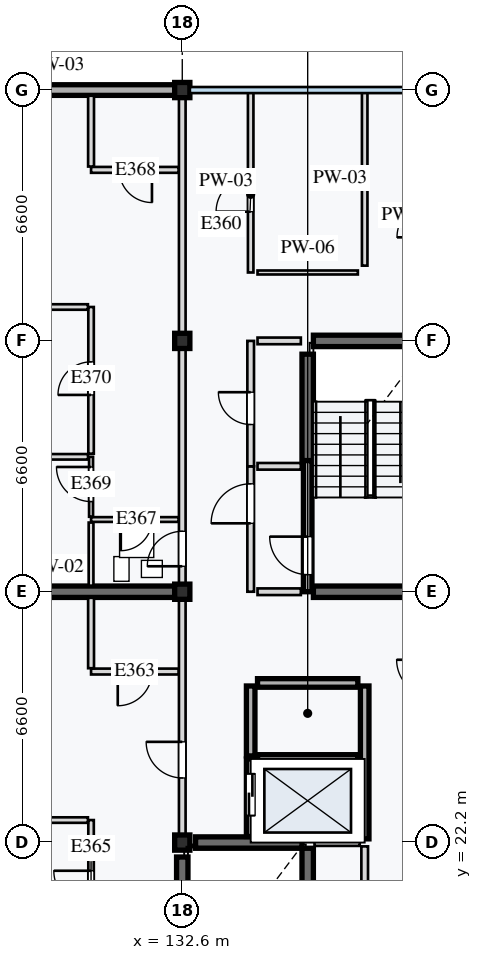
"""IFC4 building model, lengths in metres.
Left out: names, types, materials, properties, quantities, classifications, styles, units other than length and angle.
Written with IfcOpenShell. Run it as: python <this file> out.ifc"""

import sys

from ifc_helpers import new_model, si_unit, direction, frame, frame_2d, origin, origin_2d, place, context, subcontext, project, spatial, rectangle, extrude, element, fill, save


model = new_model("IFC4")
c1 = context("Model", 3, precision=1e-05, world=origin(), true_north=direction((0.0, 1.0)))
c2 = subcontext(c1, "Body", "Model", "MODEL_VIEW")
j1 = project(units=[si_unit("LENGTHUNIT", "METRE"), si_unit("PLANEANGLEUNIT", "RADIAN")], contexts=[c1])
p1 = place(None, origin())
s1 = spatial("IfcSite", under=j1, at=p1, CompositionType="ELEMENT")
p2 = place(p1, origin())
s2 = spatial("IfcBuilding", under=s1, at=p2, CompositionType="ELEMENT")
p3 = place(p2, frame((0.0, 0.0, 30.8)))
s3 = spatial("IfcBuildingStorey", under=s2, at=p3, CompositionType="ELEMENT", Elevation=30.8)
for number, where, z_axis, x_axis in (
    (1, (132.6, 22.2, 0.0), (0.0, 0.0, 1.0), (1.0, 0.0, 0.0)),
    (2, (132.6, 28.8, 0.0), (0.0, 0.0, 1.0), (1.0, 0.0, 0.0)),
    (3, (132.6, 35.4, 0.0), (0.0, 0.0, 1.0), (1.0, 0.0, 0.0)),
    (4, (132.6, 42.0, 0.0), (0.0, 0.0, 1.0), (1.0, 0.0, 0.0)),
):
    element("IfcColumn", number, at=place(p3, frame(where, z_axis=z_axis, x_axis=x_axis)), inside=s3, PredefinedType="COLUMN", context=c2, shape_type="SweptSolid", body=[
        extrude(rectangle(XDim=0.4, YDim=0.4, at=origin_2d()), origin(), (0.0, 0.0, 1.0), 3.2),
    ])
p4 = place(p3, frame((132.6, 15.98, 0.0), z_axis=(0.0, 0.0, 1.0), x_axis=(0.0, 1.0, 0.0)))
e5 = element("IfcWall", 5, at=p4, inside=s3, PredefinedType="SHEAR", context=c2, shape_type="SweptSolid", body=[
    extrude(rectangle(XDim=5.84, YDim=0.3, at=frame_2d((2.92, 0.0))), origin(), (0.0, 0.0, 1.0), 2.97),
])
p5 = place(p3, frame((135.9, 19.35, 0.0), z_axis=(0.0, 0.0, 1.0), x_axis=(0.0, 1.0, 0.0)))
e6 = element("IfcWall", 6, at=p5, inside=s3, PredefinedType="SHEAR", context=c2, shape_type="SweptSolid", body=[
    extrude(rectangle(XDim=2.7, YDim=0.3, at=frame_2d((1.35, 0.0))), origin(), (0.0, 0.0, 1.0), 2.97),
])
for number, where, z_axis, x_axis in (
    (7, (132.95, 22.2, 0.0), (0.0, 0.0, 1.0), (1.0, 0.0, 0.0)),
    (8, (135.9, 32.25, 0.0), (0.0, 0.0, 1.0), (0.0, 1.0, 0.0)),
    (9, (136.05, 28.8, 0.0), (0.0, 0.0, 1.0), (1.0, 0.0, 0.0)),
    (10, (136.05, 35.4, 0.0), (0.0, 0.0, 1.0), (1.0, 0.0, 0.0)),
):
    element("IfcWall", number, at=place(p3, frame(where, z_axis=z_axis, x_axis=x_axis)), inside=s3, PredefinedType="SHEAR", context=c2, shape_type="SweptSolid", body=[
        extrude(rectangle(XDim=2.8, YDim=0.3, at=frame_2d((1.4, 0.0))), origin(), (0.0, 0.0, 1.0), 2.97),
    ])
p6 = place(p3, frame((126.2, 28.8, 0.0), z_axis=(0.0, 0.0, 1.0), x_axis=(1.0, 0.0, 0.0)))
e11 = element("IfcWall", 11, at=p6, inside=s3, PredefinedType="SHEAR", context=c2, shape_type="SweptSolid", body=[
    extrude(rectangle(XDim=6.2, YDim=0.3, at=frame_2d((3.1, 0.0))), origin(), (0.0, 0.0, 1.0), 2.97),
])
p7 = place(p3, frame((126.2, 42.0, 0.0), z_axis=(0.0, 0.0, 1.0), x_axis=(1.0, 0.0, 0.0)))
e12 = element("IfcWall", 12, at=p7, inside=s3, PredefinedType="STANDARD", context=c2, shape_type="SweptSolid", body=[
    extrude(rectangle(XDim=6.2, YDim=0.28, at=frame_2d((3.1, 0.0))), origin(), (0.0, 0.0, 1.0), 2.65),
])
p8 = place(p3, frame((137.4, 19.3, 0.0), z_axis=(0.0, 0.0, 1.0), x_axis=(0.0, 1.0, 0.0)))
e13 = element("IfcWall", 13, at=p8, inside=s3, PredefinedType="PARTITIONING", context=c2, shape_type="SweptSolid", body=[
    extrude(rectangle(XDim=2.8, YDim=0.175, at=frame_2d((1.4, 0.0))), origin(), (0.0, 0.0, 1.0), 2.97),
])
p9 = place(p8, frame((0.95, 0.0, 0.0)))
e14 = element("IfcOpeningElement", 14, at=p9, cuts=e13, PredefinedType="OPENING", context=c2, shape_type="SweptSolid", body=[
    extrude(rectangle(XDim=0.85, YDim=2.0, at=frame_2d((0.425, 1.0))), frame((0.0, 0.097, 0.0), z_axis=(0.0, -1.0, 0.0), x_axis=(1.0, 0.0, 0.0)), (0.0, 0.0, 1.0), 0.195),
])
p10 = place(p3, frame((136.08, 22.2, 0.0), z_axis=(0.0, 0.0, 1.0), x_axis=(1.0, 0.0, 0.0)))
e15 = element("IfcWall", 15, at=p10, inside=s3, PredefinedType="PARTITIONING", context=c2, shape_type="SweptSolid", body=[
    extrude(rectangle(XDim=1.19, YDim=0.175, at=frame_2d((0.595, 0.0))), origin(), (0.0, 0.0, 1.0), 2.97),
])
p11 = place(p3, frame((134.4, 22.36, 0.0), z_axis=(0.0, 0.0, 1.0), x_axis=(0.0, 1.0, 0.0)))
e16 = element("IfcWall", 16, at=p11, inside=s3, PredefinedType="STANDARD", context=c2, shape_type="SweptSolid", body=[
    extrude(rectangle(XDim=2.04, YDim=0.225, at=frame_2d((1.02, 0.0))), origin(), (0.0, 0.0, 1.0), 2.97),
])
p12 = place(p11, frame((0.55, 0.0, 0.0)))
e17 = element("IfcOpeningElement", 17, at=p12, cuts=e16, PredefinedType="OPENING", context=c2, shape_type="SweptSolid", body=[
    extrude(rectangle(XDim=1.1, YDim=2.1, at=frame_2d((0.55, 1.05))), frame((0.0, 0.123, 0.0), z_axis=(0.0, -1.0, 0.0), x_axis=(1.0, 0.0, 0.0)), (0.0, 0.0, 1.0), 0.245),
])
p13 = place(p3, frame((134.4, 24.48, 0.0), z_axis=(0.0, 0.0, 1.0), x_axis=(0.0, 1.0, 0.0)))
e18 = element("IfcWall", 18, at=p13, inside=s3, PredefinedType="STANDARD", context=c2, shape_type="SweptSolid", body=[
    extrude(rectangle(XDim=1.84, YDim=0.225, at=frame_2d((0.92, 0.0))), origin(), (0.0, 0.0, 1.0), 2.97),
])
p14 = place(p3, frame((137.4, 22.298, 0.0), z_axis=(0.0, 0.0, 1.0), x_axis=(0.0, 1.0, 0.0)))
e19 = element("IfcWall", 19, at=p14, inside=s3, PredefinedType="STANDARD", context=c2, shape_type="SweptSolid", body=[
    extrude(rectangle(XDim=4.022, YDim=0.225, at=frame_2d((2.011, 0.0))), origin(), (0.0, 0.0, 1.0), 2.97),
])
for number, where, z_axis, x_axis in (
    (20, (134.58, 24.4, 0.0), (0.0, 0.0, 1.0), (1.0, 0.0, 0.0)),
    (21, (134.58, 26.4, 0.0), (0.0, 0.0, 1.0), (1.0, 0.0, 0.0)),
):
    element("IfcWall", number, at=place(p3, frame(where, z_axis=z_axis, x_axis=x_axis)), inside=s3, PredefinedType="STANDARD", context=c2, shape_type="SweptSolid", body=[
        extrude(rectangle(XDim=2.64, YDim=0.225, at=frame_2d((1.32, 0.0))), origin(), (0.0, 0.0, 1.0), 2.97),
    ])
p15 = place(p3, frame((135.9, 28.8, 0.0), z_axis=(0.0, 0.0, 1.0), x_axis=(0.0, 1.0, 0.0)))
e22 = element("IfcWall", 22, at=p15, inside=s3, PredefinedType="STANDARD", context=c2, shape_type="SweptSolid", body=[
    extrude(rectangle(XDim=3.45, YDim=0.225, at=frame_2d((1.725, 0.0))), origin(), (0.0, 0.0, 1.0), 2.97),
])
p16 = place(p15, frame((0.45, 0.0, 0.0)))
e23 = element("IfcOpeningElement", 23, at=p16, cuts=e22, PredefinedType="OPENING", context=c2, shape_type="SweptSolid", body=[
    extrude(rectangle(XDim=1.0, YDim=2.16, at=frame_2d((0.5, 1.08))), frame((0.0, 0.123, 0.0), z_axis=(0.0, -1.0, 0.0), x_axis=(1.0, 0.0, 0.0)), (0.0, 0.0, 1.0), 0.245),
])
p17 = place(p3, frame((134.4, 28.8, 0.0), z_axis=(0.0, 0.0, 1.0), x_axis=(0.0, 1.0, 0.0)))
e24 = element("IfcWall", 24, at=p17, inside=s3, PredefinedType="PARTITIONING", context=c2, shape_type="SweptSolid", body=[
    extrude(rectangle(XDim=3.3, YDim=0.175, at=frame_2d((1.65, 0.0))), origin(), (0.0, 0.0, 1.0), 2.97),
])
p18 = place(p17, frame((1.8, 0.0, 0.0)))
e25 = element("IfcOpeningElement", 25, at=p18, cuts=e24, PredefinedType="OPENING", context=c2, shape_type="SweptSolid", body=[
    extrude(rectangle(XDim=1.04, YDim=2.12, at=frame_2d((0.52, 1.06))), frame((0.0, 0.097, 0.0), z_axis=(0.0, -1.0, 0.0), x_axis=(1.0, 0.0, 0.0)), (0.0, 0.0, 1.0), 0.195),
])
p19 = place(p3, frame((134.4, 32.1, 0.0), z_axis=(0.0, 0.0, 1.0), x_axis=(0.0, 1.0, 0.0)))
e26 = element("IfcWall", 26, at=p19, inside=s3, PredefinedType="PARTITIONING", context=c2, shape_type="SweptSolid", body=[
    extrude(rectangle(XDim=3.3, YDim=0.175, at=frame_2d((1.65, 0.0))), origin(), (0.0, 0.0, 1.0), 2.97),
])
p20 = place(p19, frame((1.1, 0.0, 0.0)))
e27 = element("IfcOpeningElement", 27, at=p20, cuts=e26, PredefinedType="OPENING", context=c2, shape_type="SweptSolid", body=[
    extrude(rectangle(XDim=0.85, YDim=2.0, at=frame_2d((0.425, 1.0))), frame((0.0, 0.097, 0.0), z_axis=(0.0, -1.0, 0.0), x_axis=(1.0, 0.0, 0.0)), (0.0, 0.0, 1.0), 0.195),
])
for number, where, z_axis, x_axis in (
    (28, (134.58, 28.8, 0.0), (0.0, 0.0, 1.0), (1.0, 0.0, 0.0)),
    (29, (134.58, 32.1, 0.0), (0.0, 0.0, 1.0), (1.0, 0.0, 0.0)),
    (30, (134.58, 35.4, 0.0), (0.0, 0.0, 1.0), (1.0, 0.0, 0.0)),
):
    element("IfcWall", number, at=place(p3, frame(where, z_axis=z_axis, x_axis=x_axis)), inside=s3, PredefinedType="PARTITIONING", context=c2, shape_type="SweptSolid", body=[
        extrude(rectangle(XDim=1.14, YDim=0.175, at=frame_2d((0.57, 0.0))), origin(), (0.0, 0.0, 1.0), 2.97),
    ])
p21 = place(p3, frame((134.4, 37.2, 0.0), z_axis=(0.0, 0.0, 1.0), x_axis=(0.0, 1.0, 0.0)))
e31 = element("IfcWall", 31, at=p21, inside=s3, PredefinedType="PARTITIONING", context=c2, shape_type="SweptSolid", body=[
    extrude(rectangle(XDim=4.8, YDim=0.145, at=frame_2d((2.4, 0.0))), origin(), (0.0, 0.0, 1.0), 2.97),
])
p22 = place(p21, frame((1.6, 0.0, 0.0)))
e32 = element("IfcOpeningElement", 32, at=p22, cuts=e31, PredefinedType="OPENING", context=c2, shape_type="SweptSolid", body=[
    extrude(rectangle(XDim=0.91, YDim=2.14, at=frame_2d((0.455, 1.07))), frame((0.0, 0.083, 0.0), z_axis=(0.0, -1.0, 0.0), x_axis=(1.0, 0.0, 0.0)), (0.0, 0.0, 1.0), 0.165),
])
p23 = place(p3, frame((137.4, 37.38, 0.0), z_axis=(0.0, 0.0, 1.0), x_axis=(0.0, 1.0, 0.0)))
e33 = element("IfcWall", 33, at=p23, inside=s3, PredefinedType="PARTITIONING", context=c2, shape_type="SweptSolid", body=[
    extrude(rectangle(XDim=4.6, YDim=0.145, at=frame_2d((2.3, 0.0))), origin(), (0.0, 0.0, 1.0), 2.97),
])
p24 = place(p3, frame((134.58, 37.2, 0.0), z_axis=(0.0, 0.0, 1.0), x_axis=(1.0, 0.0, 0.0)))
e34 = element("IfcWall", 34, at=p24, inside=s3, PredefinedType="PARTITIONING", context=c2, shape_type="SweptSolid", body=[
    extrude(rectangle(XDim=2.64, YDim=0.105, at=frame_2d((1.32, 0.0))), origin(), (0.0, 0.0, 1.0), 2.97),
])
p25 = place(p3, frame((132.6, 22.2, 0.0), z_axis=(0.0, 0.0, 1.0), x_axis=(0.0, 1.0, 0.0)))
e35 = element("IfcWall", 35, at=p25, inside=s3, PredefinedType="PARTITIONING", context=c2, shape_type="SweptSolid", body=[
    extrude(rectangle(XDim=6.6, YDim=0.175, at=frame_2d((3.3, 0.0))), origin(), (0.0, 0.0, 1.0), 2.55),
])
p26 = place(p25, frame((1.7, 0.0, 0.0)))
e36 = element("IfcOpeningElement", 36, at=p26, cuts=e35, PredefinedType="OPENING", context=c2, shape_type="SweptSolid", body=[
    extrude(rectangle(XDim=0.95, YDim=2.16, at=frame_2d((0.475, 1.08))), frame((0.0, 0.097, 0.0), z_axis=(0.0, -1.0, 0.0), x_axis=(1.0, 0.0, 0.0)), (0.0, 0.0, 1.0), 0.195),
])
p27 = place(p3, frame((132.502, 26.7, 0.0), z_axis=(0.0, 0.0, 1.0), x_axis=(-1.0, 0.0, 0.0)))
e37 = element("IfcWall", 37, at=p27, inside=s3, PredefinedType="PARTITIONING", context=c2, shape_type="SweptSolid", body=[
    extrude(rectangle(XDim=2.302, YDim=0.155, at=frame_2d((1.151, 0.0))), origin(), (0.0, 0.0, 1.0), 2.97),
])
p28 = place(p27, frame((0.7, 0.0, 0.0)))
e38 = element("IfcOpeningElement", 38, at=p28, cuts=e37, PredefinedType="OPENING", context=c2, shape_type="SweptSolid", body=[
    extrude(rectangle(XDim=0.9, YDim=2.1, at=frame_2d((0.45, 1.05))), frame((0.0, 0.087, 0.0), z_axis=(0.0, -1.0, 0.0), x_axis=(1.0, 0.0, 0.0)), (0.0, 0.0, 1.0), 0.175),
])
p29 = place(p3, frame((130.2, 26.788, 0.0), z_axis=(0.0, 0.0, 1.0), x_axis=(0.0, 1.0, 0.0)))
e39 = element("IfcWall", 39, at=p29, inside=s3, PredefinedType="PARTITIONING", context=c2, shape_type="SweptSolid", body=[
    extrude(rectangle(XDim=1.852, YDim=0.155, at=frame_2d((0.926, 0.0))), origin(), (0.0, 0.0, 1.0), 2.97),
])
p30 = place(p3, frame((130.2, 18.933, 0.0), z_axis=(0.0, 0.0, 1.0), x_axis=(0.0, 1.0, 0.0)))
e40 = element("IfcWall", 40, at=p30, inside=s3, PredefinedType="PARTITIONING", context=c2, shape_type="SweptSolid", body=[
    extrude(rectangle(XDim=3.859, YDim=0.145, at=frame_2d((1.93, 0.0))), origin(), (0.0, 0.0, 1.0), 2.97),
])
p31 = place(p30, frame((1.546, 0.0, 0.0)))
e41 = element("IfcOpeningElement", 41, at=p31, cuts=e40, PredefinedType="OPENING", context=c2, shape_type="SweptSolid", body=[
    extrude(rectangle(XDim=0.98, YDim=2.12, at=frame_2d((0.49, 1.06))), frame((0.0, 0.083, 0.0), z_axis=(0.0, -1.0, 0.0), x_axis=(1.0, 0.0, 0.0)), (0.0, 0.0, 1.0), 0.165),
])
p32 = place(p3, frame((130.117, 22.792, 0.0), z_axis=(0.0, 0.0, 1.0), x_axis=(-1.0, 0.0, 0.0)))
e42 = element("IfcWall", 42, at=p32, inside=s3, PredefinedType="PARTITIONING", context=c2, shape_type="SweptSolid", body=[
    extrude(rectangle(XDim=3.968, YDim=0.145, at=frame_2d((1.984, 0.0))), origin(), (0.0, 0.0, 1.0), 2.97),
])
p33 = place(p3, frame((132.6, 28.8, 0.0), z_axis=(0.0, 0.0, 1.0), x_axis=(0.0, 1.0, 0.0)))
e43 = element("IfcWall", 43, at=p33, inside=s3, PredefinedType="PARTITIONING", context=c2, shape_type="SweptSolid", body=[
    extrude(rectangle(XDim=13.2, YDim=0.175, at=frame_2d((6.6, 0.0))), origin(), (0.0, 0.0, 1.0), 2.55),
])
p34 = place(p33, frame((0.67, 0.0, 0.0)))
e44 = element("IfcOpeningElement", 44, at=p34, cuts=e43, PredefinedType="OPENING", context=c2, shape_type="SweptSolid", body=[
    extrude(rectangle(XDim=0.92, YDim=2.14, at=frame_2d((0.46, 1.07))), frame((0.0, 0.097, 0.0), z_axis=(0.0, -1.0, 0.0), x_axis=(1.0, 0.0, 0.0)), (0.0, 0.0, 1.0), 0.195),
])
p35 = place(p3, frame((132.502, 30.7, 0.0), z_axis=(0.0, 0.0, 1.0), x_axis=(-1.0, 0.0, 0.0)))
e45 = element("IfcWall", 45, at=p35, inside=s3, PredefinedType="PARTITIONING", context=c2, shape_type="SweptSolid", body=[
    extrude(rectangle(XDim=2.302, YDim=0.125, at=frame_2d((1.151, 0.0))), origin(), (0.0, 0.0, 1.0), 2.97),
])
p36 = place(p35, frame((0.7, 0.0, 0.0)))
e46 = element("IfcOpeningElement", 46, at=p36, cuts=e45, PredefinedType="OPENING", context=c2, shape_type="SweptSolid", body=[
    extrude(rectangle(XDim=0.82, YDim=2.05, at=frame_2d((0.41, 1.025))), frame((0.0, 0.073, 0.0), z_axis=(0.0, -1.0, 0.0), x_axis=(1.0, 0.0, 0.0)), (0.0, 0.0, 1.0), 0.145),
])
p37 = place(p3, frame((130.2, 28.96, 0.0), z_axis=(0.0, 0.0, 1.0), x_axis=(0.0, 1.0, 0.0)))
e47 = element("IfcWall", 47, at=p37, inside=s3, PredefinedType="PARTITIONING", context=c2, shape_type="SweptSolid", body=[
    extrude(rectangle(XDim=1.66, YDim=0.125, at=frame_2d((0.83, 0.0))), origin(), (0.0, 0.0, 1.0), 2.97),
])
p38 = place(p3, frame((132.502, 39.9, 0.0), z_axis=(0.0, 0.0, 1.0), x_axis=(-1.0, 0.0, 0.0)))
e48 = element("IfcWall", 48, at=p38, inside=s3, PredefinedType="PARTITIONING", context=c2, shape_type="SweptSolid", body=[
    extrude(rectangle(XDim=2.302, YDim=0.155, at=frame_2d((1.151, 0.0))), origin(), (0.0, 0.0, 1.0), 2.97),
])
p39 = place(p38, frame((0.7, 0.0, 0.0)))
e49 = element("IfcOpeningElement", 49, at=p39, cuts=e48, PredefinedType="OPENING", context=c2, shape_type="SweptSolid", body=[
    extrude(rectangle(XDim=0.86, YDim=2.12, at=frame_2d((0.43, 1.06))), frame((0.0, 0.087, 0.0), z_axis=(0.0, -1.0, 0.0), x_axis=(1.0, 0.0, 0.0)), (0.0, 0.0, 1.0), 0.175),
])
p40 = place(p3, frame((130.2, 39.988, 0.0), z_axis=(0.0, 0.0, 1.0), x_axis=(0.0, 1.0, 0.0)))
e50 = element("IfcWall", 50, at=p40, inside=s3, PredefinedType="PARTITIONING", context=c2, shape_type="SweptSolid", body=[
    extrude(rectangle(XDim=1.863, YDim=0.155, at=frame_2d((0.931, 0.0))), origin(), (0.0, 0.0, 1.0), 2.97),
])
p41 = place(p3, frame((130.2, 30.772, 0.0), z_axis=(0.0, 0.0, 1.0), x_axis=(0.0, 1.0, 0.0)))
e51 = element("IfcWall", 51, at=p41, inside=s3, PredefinedType="PARTITIONING", context=c2, shape_type="SweptSolid", body=[
    extrude(rectangle(XDim=1.578, YDim=0.105, at=frame_2d((0.789, 0.0))), origin(), (0.0, 0.0, 1.0), 2.97),
])
p42 = place(p41, frame((0.4, 0.0, 0.0)))
e52 = element("IfcOpeningElement", 52, at=p42, cuts=e51, PredefinedType="OPENING", context=c2, shape_type="SweptSolid", body=[
    extrude(rectangle(XDim=0.91, YDim=2.14, at=frame_2d((0.455, 1.07))), frame((0.0, 0.062, 0.0), z_axis=(0.0, -1.0, 0.0), x_axis=(1.0, 0.0, 0.0)), (0.0, 0.0, 1.0), 0.125),
])
p43 = place(p3, frame((130.12, 32.35, 0.0), z_axis=(0.0, 0.0, 1.0), x_axis=(-1.0, 0.0, 0.0)))
e53 = element("IfcWall", 53, at=p43, inside=s3, PredefinedType="PARTITIONING", context=c2, shape_type="SweptSolid", body=[
    extrude(rectangle(XDim=3.97, YDim=0.145, at=frame_2d((1.985, 0.0))), origin(), (0.0, 0.0, 1.0), 2.97),
])
p44 = place(p3, frame((130.2, 32.433, 0.0), z_axis=(0.0, 0.0, 1.0), x_axis=(0.0, 1.0, 0.0)))
e54 = element("IfcWall", 54, at=p44, inside=s3, PredefinedType="PARTITIONING", context=c2, shape_type="SweptSolid", body=[
    extrude(rectangle(XDim=3.859, YDim=0.145, at=frame_2d((1.93, 0.0))), origin(), (0.0, 0.0, 1.0), 2.97),
])
p45 = place(p44, frame((1.546, 0.0, 0.0)))
e55 = element("IfcOpeningElement", 55, at=p45, cuts=e54, PredefinedType="OPENING", context=c2, shape_type="SweptSolid", body=[
    extrude(rectangle(XDim=0.87, YDim=2.08, at=frame_2d((0.435, 1.04))), frame((0.0, 0.083, 0.0), z_axis=(0.0, -1.0, 0.0), x_axis=(1.0, 0.0, 0.0)), (0.0, 0.0, 1.0), 0.165),
])
p46 = place(p3, frame((130.117, 36.292, 0.0), z_axis=(0.0, 0.0, 1.0), x_axis=(-1.0, 0.0, 0.0)))
e56 = element("IfcWall", 56, at=p46, inside=s3, PredefinedType="PARTITIONING", context=c2, shape_type="SweptSolid", body=[
    extrude(rectangle(XDim=3.968, YDim=0.145, at=frame_2d((1.984, 0.0))), origin(), (0.0, 0.0, 1.0), 2.97),
])
p47 = place(p12, origin())
e57 = element("IfcDoor", 57, at=p47, inside=s3, OperationType="DOUBLE_DOOR_SLIDING", PredefinedType="DOOR", context=c2, shape_type="SweptSolid", body=[
    extrude(rectangle(XDim=1.1, YDim=2.1, at=frame_2d((0.55, 1.05))), frame((0.0, 0.025, 0.0), z_axis=(0.0, -1.0, 0.0), x_axis=(1.0, 0.0, 0.0)), (0.0, 0.0, 1.0), 0.05),
])
fill(e17, e57)
p48 = place(p16, origin())
e58 = element("IfcDoor", 58, at=p48, inside=s3, OperationType="SINGLE_SWING_RIGHT", PredefinedType="DOOR", context=c2, shape_type="SweptSolid", body=[
    extrude(rectangle(XDim=1.0, YDim=2.16, at=frame_2d((0.5, 1.08))), frame((0.0, 0.025, 0.0), z_axis=(0.0, -1.0, 0.0), x_axis=(1.0, 0.0, 0.0)), (0.0, 0.0, 1.0), 0.05),
])
fill(e23, e58)
p49 = place(p18, origin())
e59 = element("IfcDoor", 59, at=p49, inside=s3, OperationType="SINGLE_SWING_LEFT", PredefinedType="DOOR", context=c2, shape_type="SweptSolid", body=[
    extrude(rectangle(XDim=1.04, YDim=2.12, at=frame_2d((0.52, 1.06))), frame((0.0, 0.025, 0.0), z_axis=(0.0, -1.0, 0.0), x_axis=(1.0, 0.0, 0.0)), (0.0, 0.0, 1.0), 0.05),
])
fill(e25, e59)
p50 = place(p20, origin())
e60 = element("IfcDoor", 60, at=p50, inside=s3, OperationType="SINGLE_SWING_RIGHT", PredefinedType="DOOR", context=c2, shape_type="SweptSolid", body=[
    extrude(rectangle(XDim=0.85, YDim=2.0, at=frame_2d((0.425, 1.0))), frame((0.0, 0.025, 0.0), z_axis=(0.0, -1.0, 0.0), x_axis=(1.0, 0.0, 0.0)), (0.0, 0.0, 1.0), 0.05),
])
fill(e27, e60)
p51 = place(p22, origin())
e61 = element("IfcDoor", 61, at=p51, inside=s3, OperationType="SINGLE_SWING_LEFT", PredefinedType="DOOR", context=c2, shape_type="SweptSolid", body=[
    extrude(rectangle(XDim=0.91, YDim=2.14, at=frame_2d((0.455, 1.07))), frame((0.0, 0.025, 0.0), z_axis=(0.0, -1.0, 0.0), x_axis=(1.0, 0.0, 0.0)), (0.0, 0.0, 1.0), 0.05),
])
fill(e32, e61)
p52 = place(p26, origin())
e62 = element("IfcDoor", 62, at=p52, inside=s3, OperationType="SINGLE_SWING_RIGHT", PredefinedType="DOOR", context=c2, shape_type="SweptSolid", body=[
    extrude(rectangle(XDim=0.95, YDim=2.16, at=frame_2d((0.475, 1.08))), frame((0.0, 0.025, 0.0), z_axis=(0.0, -1.0, 0.0), x_axis=(1.0, 0.0, 0.0)), (0.0, 0.0, 1.0), 0.05),
])
fill(e36, e62)
p53 = place(p28, origin())
e63 = element("IfcDoor", 63, at=p53, inside=s3, OperationType="SINGLE_SWING_RIGHT", PredefinedType="DOOR", context=c2, shape_type="SweptSolid", body=[
    extrude(rectangle(XDim=0.9, YDim=2.1, at=frame_2d((0.45, 1.05))), frame((0.0, 0.025, 0.0), z_axis=(0.0, -1.0, 0.0), x_axis=(1.0, 0.0, 0.0)), (0.0, 0.0, 1.0), 0.05),
])
fill(e38, e63)
p54 = place(p31, origin())
e64 = element("IfcDoor", 64, at=p54, inside=s3, OperationType="SINGLE_SWING_RIGHT", PredefinedType="DOOR", context=c2, shape_type="SweptSolid", body=[
    extrude(rectangle(XDim=0.98, YDim=2.12, at=frame_2d((0.49, 1.06))), frame((0.0, 0.025, 0.0), z_axis=(0.0, -1.0, 0.0), x_axis=(1.0, 0.0, 0.0)), (0.0, 0.0, 1.0), 0.05),
])
fill(e41, e64)
p55 = place(p34, origin())
e65 = element("IfcDoor", 65, at=p55, inside=s3, OperationType="SINGLE_SWING_LEFT", PredefinedType="DOOR", context=c2, shape_type="SweptSolid", body=[
    extrude(rectangle(XDim=0.92, YDim=2.14, at=frame_2d((0.46, 1.07))), frame((0.0, 0.025, 0.0), z_axis=(0.0, -1.0, 0.0), x_axis=(1.0, 0.0, 0.0)), (0.0, 0.0, 1.0), 0.05),
])
fill(e44, e65)
p56 = place(p36, origin())
e66 = element("IfcDoor", 66, at=p56, inside=s3, OperationType="SINGLE_SWING_RIGHT", PredefinedType="DOOR", context=c2, shape_type="SweptSolid", body=[
    extrude(rectangle(XDim=0.82, YDim=2.05, at=frame_2d((0.41, 1.025))), frame((0.0, 0.025, 0.0), z_axis=(0.0, -1.0, 0.0), x_axis=(1.0, 0.0, 0.0)), (0.0, 0.0, 1.0), 0.05),
])
fill(e46, e66)
p57 = place(p39, origin())
e67 = element("IfcDoor", 67, at=p57, inside=s3, OperationType="SINGLE_SWING_LEFT", PredefinedType="DOOR", context=c2, shape_type="SweptSolid", body=[
    extrude(rectangle(XDim=0.86, YDim=2.12, at=frame_2d((0.43, 1.06))), frame((0.0, 0.025, 0.0), z_axis=(0.0, -1.0, 0.0), x_axis=(1.0, 0.0, 0.0)), (0.0, 0.0, 1.0), 0.05),
])
fill(e49, e67)
p58 = place(p42, origin())
e68 = element("IfcDoor", 68, at=p58, inside=s3, OperationType="SINGLE_SWING_RIGHT", PredefinedType="DOOR", context=c2, shape_type="SweptSolid", body=[
    extrude(rectangle(XDim=0.91, YDim=2.14, at=frame_2d((0.455, 1.07))), frame((0.0, 0.025, 0.0), z_axis=(0.0, -1.0, 0.0), x_axis=(1.0, 0.0, 0.0)), (0.0, 0.0, 1.0), 0.05),
])
fill(e52, e68)
p59 = place(p45, origin())
e69 = element("IfcDoor", 69, at=p59, inside=s3, OperationType="SINGLE_SWING_LEFT", PredefinedType="DOOR", context=c2, shape_type="SweptSolid", body=[
    extrude(rectangle(XDim=0.87, YDim=2.08, at=frame_2d((0.435, 1.04))), frame((0.0, 0.025, 0.0), z_axis=(0.0, -1.0, 0.0), x_axis=(1.0, 0.0, 0.0)), (0.0, 0.0, 1.0), 0.05),
])
fill(e55, e69)
save(model, sys.argv[1])
